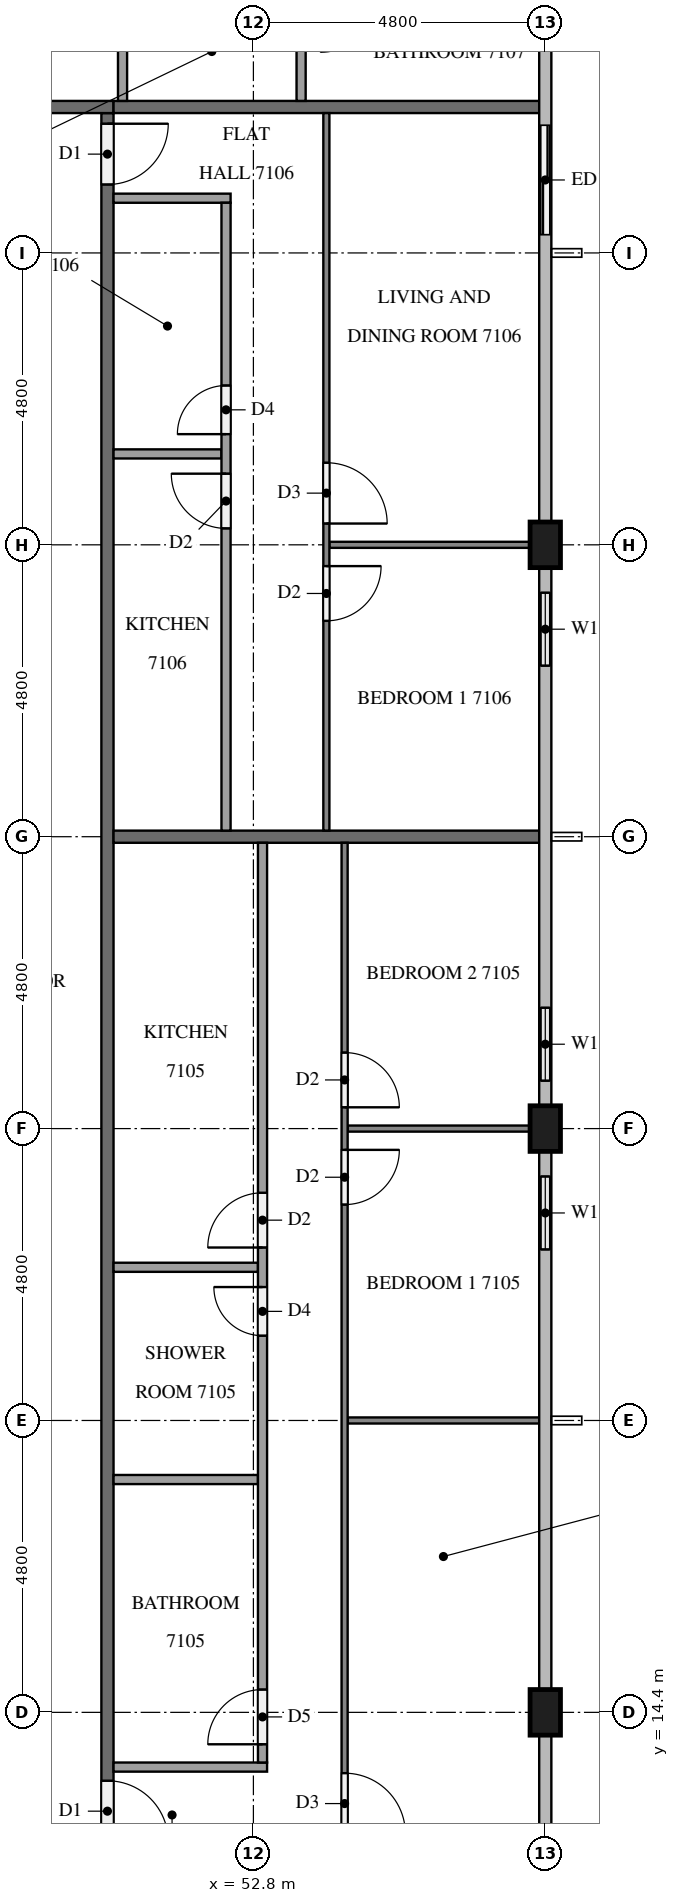
"""IFC4 building model, lengths in metres.
Left out: names, types, materials, properties, quantities, classifications, styles, units other than length and angle.
Written with IfcOpenShell. Run it as: python <this file> out.ifc"""

import sys

from ifc_helpers import new_model, si_unit, direction, frame, frame_2d, origin, origin_2d, place, context, subcontext, project, spatial, rectangle, extrude, element, fill, save


model = new_model("IFC4")
c1 = context("Model", 3, precision=1e-05, world=origin(), true_north=direction((0.0, 1.0)))
c2 = subcontext(c1, "Body", "Model", "MODEL_VIEW")
j1 = project(units=[si_unit("LENGTHUNIT", "METRE"), si_unit("PLANEANGLEUNIT", "RADIAN")], contexts=[c1])
p1 = place(None, origin())
s1 = spatial("IfcSite", under=j1, at=p1, CompositionType="ELEMENT")
p2 = place(p1, origin())
s2 = spatial("IfcBuilding", under=s1, at=p2, CompositionType="ELEMENT")
p3 = place(p2, frame((0.0, 0.0, 272.1)))
s3 = spatial("IfcBuildingStorey", under=s2, at=p3, CompositionType="ELEMENT", Elevation=272.1)
for number, where, z_axis, x_axis in (
    (1, (57.6, 14.4, 0.0), (0.0, 0.0, 1.0), (0.0, 1.0, 0.0)),
    (2, (57.6, 24.0, 0.0), (0.0, 0.0, 1.0), (0.0, 1.0, 0.0)),
    (3, (57.6, 33.6, 0.0), (0.0, 0.0, 1.0), (0.0, 1.0, 0.0)),
):
    element("IfcColumn", number, at=place(p3, frame(where, z_axis=z_axis, x_axis=x_axis)), inside=s3, PredefinedType="COLUMN", context=c2, shape_type="SweptSolid", body=[
        extrude(rectangle(XDim=0.75, YDim=0.5, at=origin_2d()), origin(), (0.0, 0.0, 1.0), 3.2),
    ])
p4 = place(p3, frame((57.6, 21.6, 0.0), z_axis=(0.0, 0.0, 1.0), x_axis=(0.0, 1.0, 0.0)))
e4 = element("IfcWall", 4, at=p4, inside=s3, PredefinedType="SOLIDWALL", context=c2, shape_type="SweptSolid", body=[
    extrude(rectangle(XDim=2.025, YDim=0.15, at=frame_2d((1.012, 0.0))), origin(), (0.0, 0.0, 1.0), 3.2),
])
p5 = place(p4, frame((0.413, 0.0, 0.9)))
e5 = element("IfcOpeningElement", 5, at=p5, cuts=e4, PredefinedType="OPENING", context=c2, shape_type="SweptSolid", body=[
    extrude(rectangle(XDim=1.2, YDim=1.4, at=frame_2d((0.6, 0.7))), frame((0.0, 0.085, 0.0), z_axis=(0.0, -1.0, 0.0), x_axis=(1.0, 0.0, 0.0)), (0.0, 0.0, 1.0), 0.17),
])
p6 = place(p3, frame((57.6, 24.375, 0.0), z_axis=(0.0, 0.0, 1.0), x_axis=(0.0, 1.0, 0.0)))
e6 = element("IfcWall", 6, at=p6, inside=s3, PredefinedType="SOLIDWALL", context=c2, shape_type="SweptSolid", body=[
    extrude(rectangle(XDim=2.025, YDim=0.15, at=frame_2d((1.012, 0.0))), origin(), (0.0, 0.0, 1.0), 3.2),
])
p7 = place(p6, frame((0.413, 0.0, 0.9)))
e7 = element("IfcOpeningElement", 7, at=p7, cuts=e6, PredefinedType="OPENING", context=c2, shape_type="SweptSolid", body=[
    extrude(rectangle(XDim=1.2, YDim=1.4, at=frame_2d((0.6, 0.7))), frame((0.0, 0.085, 0.0), z_axis=(0.0, -1.0, 0.0), x_axis=(1.0, 0.0, 0.0)), (0.0, 0.0, 1.0), 0.17),
])
p8 = place(p3, frame((57.6, 31.2, 0.0), z_axis=(0.0, 0.0, 1.0), x_axis=(0.0, 1.0, 0.0)))
e8 = element("IfcWall", 8, at=p8, inside=s3, PredefinedType="SOLIDWALL", context=c2, shape_type="SweptSolid", body=[
    extrude(rectangle(XDim=2.025, YDim=0.15, at=frame_2d((1.013, 0.0))), origin(), (0.0, 0.0, 1.0), 3.2),
])
p9 = place(p8, frame((0.413, 0.0, 0.9)))
e9 = element("IfcOpeningElement", 9, at=p9, cuts=e8, PredefinedType="OPENING", context=c2, shape_type="SweptSolid", body=[
    extrude(rectangle(XDim=1.2, YDim=1.4, at=frame_2d((0.6, 0.7))), frame((0.0, 0.085, 0.0), z_axis=(0.0, -1.0, 0.0), x_axis=(1.0, 0.0, 0.0)), (0.0, 0.0, 1.0), 0.17),
])
p10 = place(p3, frame((57.6, 38.4, 0.0), z_axis=(0.0, 0.0, 1.0), x_axis=(0.0, 1.0, 0.0)))
e10 = element("IfcWall", 10, at=p10, inside=s3, PredefinedType="SOLIDWALL", context=c2, shape_type="SweptSolid", body=[
    extrude(rectangle(XDim=2.4, YDim=0.15, at=frame_2d((1.2, 0.0))), origin(), (0.0, 0.0, 1.0), 3.2),
])
p11 = place(p10, frame((0.3, 0.0, 0.0)))
e11 = element("IfcOpeningElement", 11, at=p11, cuts=e10, PredefinedType="OPENING", context=c2, shape_type="SweptSolid", body=[
    extrude(rectangle(XDim=1.8, YDim=2.4, at=frame_2d((0.9, 1.2))), frame((0.0, 0.085, 0.0), z_axis=(0.0, -1.0, 0.0), x_axis=(1.0, 0.0, 0.0)), (0.0, 0.0, 1.0), 0.17),
])
p12 = place(p3, frame((50.4, 40.7, 0.0), z_axis=(0.0, 0.0, 1.0), x_axis=(0.0, -1.0, 0.0)))
e12 = element("IfcWall", 12, at=p12, inside=s3, PredefinedType="PARTITIONING", context=c2, shape_type="SweptSolid", body=[
    extrude(rectangle(XDim=28.6, YDim=0.2, at=frame_2d((14.3, 0.0))), origin(), (0.0, 0.0, 1.0), 3.2),
])
p13 = place(p12, frame((27.425, 0.0, 0.0)))
e13 = element("IfcOpeningElement", 13, at=p13, cuts=e12, PredefinedType="OPENING", context=c2, shape_type="SweptSolid", body=[
    extrude(rectangle(XDim=1.0, YDim=2.1, at=frame_2d((0.5, 1.05))), frame((0.0, 0.11, 0.0), z_axis=(0.0, -1.0, 0.0), x_axis=(1.0, 0.0, 0.0)), (0.0, 0.0, 1.0), 0.22),
])
p14 = place(p12, frame((0.175, 0.0, 0.0)))
e14 = element("IfcOpeningElement", 14, at=p14, cuts=e12, PredefinedType="OPENING", context=c2, shape_type="SweptSolid", body=[
    extrude(rectangle(XDim=1.0, YDim=2.1, at=frame_2d((0.5, 1.05))), frame((0.0, 0.11, 0.0), z_axis=(0.0, -1.0, 0.0), x_axis=(1.0, 0.0, 0.0)), (0.0, 0.0, 1.0), 0.22),
])
p15 = place(p3, frame((11.9, 40.8, 0.0), z_axis=(0.0, 0.0, 1.0), x_axis=(1.0, 0.0, 0.0)))
e15 = element("IfcWall", 15, at=p15, inside=s3, PredefinedType="PARTITIONING", context=c2, shape_type="SweptSolid", body=[
    extrude(rectangle(XDim=38.6, YDim=0.2, at=frame_2d((19.3, 0.0))), origin(), (0.0, 0.0, 1.0), 3.2),
])
p16 = place(p15, frame((31.575, 0.0, 0.0)))
e16 = element("IfcOpeningElement", 16, at=p16, cuts=e15, PredefinedType="OPENING", context=c2, shape_type="SweptSolid", body=[
    extrude(rectangle(XDim=1.0, YDim=2.1, at=frame_2d((0.5, 1.05))), frame((0.0, 0.11, 0.0), z_axis=(0.0, -1.0, 0.0), x_axis=(1.0, 0.0, 0.0)), (0.0, 0.0, 1.0), 0.22),
])
p17 = place(p15, frame((24.375, 0.0, 0.0)))
e17 = element("IfcOpeningElement", 17, at=p17, cuts=e15, PredefinedType="OPENING", context=c2, shape_type="SweptSolid", body=[
    extrude(rectangle(XDim=1.0, YDim=2.1, at=frame_2d((0.5, 1.05))), frame((0.0, 0.11, 0.0), z_axis=(0.0, -1.0, 0.0), x_axis=(1.0, 0.0, 0.0)), (0.0, 0.0, 1.0), 0.22),
])
p18 = place(p15, frame((22.825, 0.0, 0.0)))
e18 = element("IfcOpeningElement", 18, at=p18, cuts=e15, PredefinedType="OPENING", context=c2, shape_type="SweptSolid", body=[
    extrude(rectangle(XDim=1.0, YDim=2.1, at=frame_2d((0.5, 1.05))), frame((0.0, 0.11, 0.0), z_axis=(0.0, -1.0, 0.0), x_axis=(1.0, 0.0, 0.0)), (0.0, 0.0, 1.0), 0.22),
])
p19 = place(p15, frame((0.375, 0.0, 0.0)))
e19 = element("IfcOpeningElement", 19, at=p19, cuts=e15, PredefinedType="OPENING", context=c2, shape_type="SweptSolid", body=[
    extrude(rectangle(XDim=1.0, YDim=2.1, at=frame_2d((0.5, 1.05))), frame((0.0, 0.11, 0.0), z_axis=(0.0, -1.0, 0.0), x_axis=(1.0, 0.0, 0.0)), (0.0, 0.0, 1.0), 0.22),
])
for number, where, z_axis, x_axis in (
    (20, (50.5, 28.8, 0.0), (0.0, 0.0, 1.0), (1.0, 0.0, 0.0)),
    (21, (50.5, 40.8, 0.0), (0.0, 0.0, 1.0), (1.0, 0.0, 0.0)),
):
    element("IfcWall", number, at=place(p3, frame(where, z_axis=z_axis, x_axis=x_axis)), inside=s3, PredefinedType="PARTITIONING", context=c2, shape_type="SweptSolid", body=[
        extrude(rectangle(XDim=7.0, YDim=0.2, at=frame_2d((3.5, 0.0))), origin(), (0.0, 0.0, 1.0), 3.2),
    ])
p20 = place(p3, frame((54.35, 19.2, 0.0), z_axis=(0.0, 0.0, 1.0), x_axis=(1.0, 0.0, 0.0)))
e22 = element("IfcWall", 22, at=p20, inside=s3, PredefinedType="PARTITIONING", context=c2, shape_type="SweptSolid", body=[
    extrude(rectangle(XDim=3.15, YDim=0.1, at=frame_2d((1.575, 0.0))), origin(), (0.0, 0.0, 1.0), 3.2),
])
p21 = place(p3, frame((54.35, 24.0, 0.0), z_axis=(0.0, 0.0, 1.0), x_axis=(1.0, 0.0, 0.0)))
e23 = element("IfcWall", 23, at=p21, inside=s3, PredefinedType="PARTITIONING", context=c2, shape_type="SweptSolid", body=[
    extrude(rectangle(XDim=3.0, YDim=0.1, at=frame_2d((1.5, 0.0))), origin(), (0.0, 0.0, 1.0), 3.2),
])
p22 = place(p3, frame((54.3, 28.7, 0.0), z_axis=(0.0, 0.0, 1.0), x_axis=(0.0, -1.0, 0.0)))
e24 = element("IfcWall", 24, at=p22, inside=s3, PredefinedType="PARTITIONING", context=c2, shape_type="SweptSolid", body=[
    extrude(rectangle(XDim=16.6, YDim=0.1, at=frame_2d((8.3, 0.0))), origin(), (0.0, 0.0, 1.0), 3.2),
])
p23 = place(p22, frame((15.3, 0.0, 0.0)))
e25 = element("IfcOpeningElement", 25, at=p23, cuts=e24, PredefinedType="OPENING", context=c2, shape_type="SweptSolid", body=[
    extrude(rectangle(XDim=1.0, YDim=2.1, at=frame_2d((0.5, 1.05))), frame((0.0, 0.06, 0.0), z_axis=(0.0, -1.0, 0.0), x_axis=(1.0, 0.0, 0.0)), (0.0, 0.0, 1.0), 0.12),
])
p24 = place(p22, frame((5.05, 0.0, 0.0)))
e26 = element("IfcOpeningElement", 26, at=p24, cuts=e24, PredefinedType="OPENING", context=c2, shape_type="SweptSolid", body=[
    extrude(rectangle(XDim=0.9, YDim=2.1, at=frame_2d((0.45, 1.05))), frame((0.0, 0.06, 0.0), z_axis=(0.0, -1.0, 0.0), x_axis=(1.0, 0.0, 0.0)), (0.0, 0.0, 1.0), 0.12),
])
p25 = place(p22, frame((3.45, 0.0, 0.0)))
e27 = element("IfcOpeningElement", 27, at=p25, cuts=e24, PredefinedType="OPENING", context=c2, shape_type="SweptSolid", body=[
    extrude(rectangle(XDim=0.9, YDim=2.1, at=frame_2d((0.45, 1.05))), frame((0.0, 0.06, 0.0), z_axis=(0.0, -1.0, 0.0), x_axis=(1.0, 0.0, 0.0)), (0.0, 0.0, 1.0), 0.12),
])
for number, where, z_axis, x_axis in (
    (28, (50.5, 18.229, 0.0), (0.0, 0.0, 1.0), (1.0, 0.0, 0.0)),
    (29, (50.5, 21.719, 0.0), (0.0, 0.0, 1.0), (1.0, 0.0, 0.0)),
):
    element("IfcWall", number, at=place(p3, frame(where, z_axis=z_axis, x_axis=x_axis)), inside=s3, PredefinedType="PARTITIONING", context=c2, shape_type="SweptSolid", body=[
        extrude(rectangle(XDim=2.375, YDim=0.15, at=frame_2d((1.188, 0.0))), origin(), (0.0, 0.0, 1.0), 3.2),
    ])
p26 = place(p3, frame((50.5, 13.5, 0.0), z_axis=(0.0, 0.0, 1.0), x_axis=(1.0, 0.0, 0.0)))
e30 = element("IfcWall", 30, at=p26, inside=s3, PredefinedType="PARTITIONING", context=c2, shape_type="SweptSolid", body=[
    extrude(rectangle(XDim=2.525, YDim=0.15, at=frame_2d((1.262, 0.0))), origin(), (0.0, 0.0, 1.0), 3.2),
])
p27 = place(p3, frame((52.95, 13.575, 0.0), z_axis=(0.0, 0.0, 1.0), x_axis=(0.0, 1.0, 0.0)))
e31 = element("IfcWall", 31, at=p27, inside=s3, PredefinedType="PARTITIONING", context=c2, shape_type="SweptSolid", body=[
    extrude(rectangle(XDim=15.125, YDim=0.15, at=frame_2d((7.562, 0.0))), origin(), (0.0, 0.0, 1.0), 3.2),
])
p28 = place(p27, frame((0.3, 0.0, 0.0)))
e32 = element("IfcOpeningElement", 32, at=p28, cuts=e31, PredefinedType="OPENING", context=c2, shape_type="SweptSolid", body=[
    extrude(rectangle(XDim=0.9, YDim=2.1, at=frame_2d((0.45, 1.05))), frame((0.0, 0.085, 0.0), z_axis=(0.0, -1.0, 0.0), x_axis=(1.0, 0.0, 0.0)), (0.0, 0.0, 1.0), 0.17),
])
p29 = place(p27, frame((7.019, 0.0, 0.0)))
e33 = element("IfcOpeningElement", 33, at=p29, cuts=e31, PredefinedType="OPENING", context=c2, shape_type="SweptSolid", body=[
    extrude(rectangle(XDim=0.8, YDim=2.1, at=frame_2d((0.4, 1.05))), frame((0.0, 0.085, 0.0), z_axis=(0.0, -1.0, 0.0), x_axis=(1.0, 0.0, 0.0)), (0.0, 0.0, 1.0), 0.17),
])
p30 = place(p27, frame((8.469, 0.0, 0.0)))
e34 = element("IfcOpeningElement", 34, at=p30, cuts=e31, PredefinedType="OPENING", context=c2, shape_type="SweptSolid", body=[
    extrude(rectangle(XDim=0.9, YDim=2.1, at=frame_2d((0.45, 1.05))), frame((0.0, 0.085, 0.0), z_axis=(0.0, -1.0, 0.0), x_axis=(1.0, 0.0, 0.0)), (0.0, 0.0, 1.0), 0.17),
])
p31 = place(p3, frame((54.05, 33.6, 0.0), z_axis=(0.0, 0.0, 1.0), x_axis=(1.0, 0.0, 0.0)))
e35 = element("IfcWall", 35, at=p31, inside=s3, PredefinedType="PARTITIONING", context=c2, shape_type="SweptSolid", body=[
    extrude(rectangle(XDim=3.3, YDim=0.1, at=frame_2d((1.65, 0.0))), origin(), (0.0, 0.0, 1.0), 3.2),
])
p32 = place(p3, frame((54.0, 40.7, 0.0), z_axis=(0.0, 0.0, 1.0), x_axis=(0.0, -1.0, 0.0)))
e36 = element("IfcWall", 36, at=p32, inside=s3, PredefinedType="PARTITIONING", context=c2, shape_type="SweptSolid", body=[
    extrude(rectangle(XDim=11.8, YDim=0.1, at=frame_2d((5.9, 0.0))), origin(), (0.0, 0.0, 1.0), 3.2),
])
p33 = place(p32, frame((5.75, 0.0, 0.0)))
e37 = element("IfcOpeningElement", 37, at=p33, cuts=e36, PredefinedType="OPENING", context=c2, shape_type="SweptSolid", body=[
    extrude(rectangle(XDim=1.0, YDim=2.1, at=frame_2d((0.5, 1.05))), frame((0.0, 0.06, 0.0), z_axis=(0.0, -1.0, 0.0), x_axis=(1.0, 0.0, 0.0)), (0.0, 0.0, 1.0), 0.12),
])
p34 = place(p32, frame((7.45, 0.0, 0.0)))
e38 = element("IfcOpeningElement", 38, at=p34, cuts=e36, PredefinedType="OPENING", context=c2, shape_type="SweptSolid", body=[
    extrude(rectangle(XDim=0.9, YDim=2.1, at=frame_2d((0.45, 1.05))), frame((0.0, 0.06, 0.0), z_axis=(0.0, -1.0, 0.0), x_axis=(1.0, 0.0, 0.0)), (0.0, 0.0, 1.0), 0.12),
])
p35 = place(p3, frame((50.5, 35.095, 0.0), z_axis=(0.0, 0.0, 1.0), x_axis=(1.0, 0.0, 0.0)))
e39 = element("IfcWall", 39, at=p35, inside=s3, PredefinedType="PARTITIONING", context=c2, shape_type="SweptSolid", body=[
    extrude(rectangle(XDim=1.775, YDim=0.15, at=frame_2d((0.887, 0.0))), origin(), (0.0, 0.0, 1.0), 3.2),
])
p36 = place(p3, frame((50.5, 39.3, 0.0), z_axis=(0.0, 0.0, 1.0), x_axis=(1.0, 0.0, 0.0)))
e40 = element("IfcWall", 40, at=p36, inside=s3, PredefinedType="PARTITIONING", context=c2, shape_type="SweptSolid", body=[
    extrude(rectangle(XDim=1.925, YDim=0.15, at=frame_2d((0.962, 0.0))), origin(), (0.0, 0.0, 1.0), 3.2),
])
p37 = place(p3, frame((52.35, 28.9, 0.0), z_axis=(0.0, 0.0, 1.0), x_axis=(0.0, 1.0, 0.0)))
e41 = element("IfcWall", 41, at=p37, inside=s3, PredefinedType="PARTITIONING", context=c2, shape_type="SweptSolid", body=[
    extrude(rectangle(XDim=10.325, YDim=0.15, at=frame_2d((5.163, 0.0))), origin(), (0.0, 0.0, 1.0), 3.2),
])
p38 = place(p37, frame((6.52, 0.0, 0.0)))
e42 = element("IfcOpeningElement", 42, at=p38, cuts=e41, PredefinedType="OPENING", context=c2, shape_type="SweptSolid", body=[
    extrude(rectangle(XDim=0.8, YDim=2.1, at=frame_2d((0.4, 1.05))), frame((0.0, 0.085, 0.0), z_axis=(0.0, -1.0, 0.0), x_axis=(1.0, 0.0, 0.0)), (0.0, 0.0, 1.0), 0.17),
])
p39 = place(p37, frame((4.97, 0.0, 0.0)))
e43 = element("IfcOpeningElement", 43, at=p39, cuts=e41, PredefinedType="OPENING", context=c2, shape_type="SweptSolid", body=[
    extrude(rectangle(XDim=0.9, YDim=2.1, at=frame_2d((0.45, 1.05))), frame((0.0, 0.085, 0.0), z_axis=(0.0, -1.0, 0.0), x_axis=(1.0, 0.0, 0.0)), (0.0, 0.0, 1.0), 0.17),
])
for number, where, z_axis, x_axis in (
    (44, (50.648, 40.9, 0.0), (0.0, 0.0, 1.0), (0.0, 1.0, 0.0)),
    (45, (53.585, 40.9, 0.0), (0.0, 0.0, 1.0), (0.0, 1.0, 0.0)),
):
    element("IfcWall", number, at=place(p3, frame(where, z_axis=z_axis, x_axis=x_axis)), inside=s3, PredefinedType="PARTITIONING", context=c2, shape_type="SweptSolid", body=[
        extrude(rectangle(XDim=1.625, YDim=0.15, at=frame_2d((0.812, 0.0))), origin(), (0.0, 0.0, 1.0), 3.2),
    ])
p40 = place(p5, origin())
e46 = element("IfcWindow", 46, at=p40, inside=s3, PartitioningType="SINGLE_PANEL", PredefinedType="WINDOW", context=c2, shape_type="SweptSolid", body=[
    extrude(rectangle(XDim=1.2, YDim=1.4, at=frame_2d((0.6, 0.7))), frame((0.0, 0.03, 0.0), z_axis=(0.0, -1.0, 0.0), x_axis=(1.0, 0.0, 0.0)), (0.0, 0.0, 1.0), 0.06),
])
fill(e5, e46)
p41 = place(p7, origin())
e47 = element("IfcWindow", 47, at=p41, inside=s3, PartitioningType="SINGLE_PANEL", PredefinedType="WINDOW", context=c2, shape_type="SweptSolid", body=[
    extrude(rectangle(XDim=1.2, YDim=1.4, at=frame_2d((0.6, 0.7))), frame((0.0, 0.03, 0.0), z_axis=(0.0, -1.0, 0.0), x_axis=(1.0, 0.0, 0.0)), (0.0, 0.0, 1.0), 0.06),
])
fill(e7, e47)
p42 = place(p9, origin())
e48 = element("IfcWindow", 48, at=p42, inside=s3, PartitioningType="SINGLE_PANEL", PredefinedType="WINDOW", context=c2, shape_type="SweptSolid", body=[
    extrude(rectangle(XDim=1.2, YDim=1.4, at=frame_2d((0.6, 0.7))), frame((0.0, 0.03, 0.0), z_axis=(0.0, -1.0, 0.0), x_axis=(1.0, 0.0, 0.0)), (0.0, 0.0, 1.0), 0.06),
])
fill(e9, e48)
p43 = place(p11, origin())
e49 = element("IfcDoor", 49, at=p43, inside=s3, OperationType="SLIDING_TO_LEFT", PredefinedType="DOOR", context=c2, shape_type="SweptSolid", body=[
    extrude(rectangle(XDim=1.8, YDim=2.4, at=frame_2d((0.9, 1.2))), frame((0.0, 0.025, 0.0), z_axis=(0.0, -1.0, 0.0), x_axis=(1.0, 0.0, 0.0)), (0.0, 0.0, 1.0), 0.05),
])
fill(e11, e49)
p44 = place(p13, origin())
e50 = element("IfcDoor", 50, at=p44, inside=s3, OperationType="SINGLE_SWING_RIGHT", PredefinedType="DOOR", context=c2, shape_type="SweptSolid", body=[
    extrude(rectangle(XDim=1.0, YDim=2.1, at=frame_2d((0.5, 1.05))), frame((0.0, 0.025, 0.0), z_axis=(0.0, -1.0, 0.0), x_axis=(1.0, 0.0, 0.0)), (0.0, 0.0, 1.0), 0.05),
])
fill(e13, e50)
p45 = place(p14, origin())
e51 = element("IfcDoor", 51, at=p45, inside=s3, OperationType="SINGLE_SWING_LEFT", PredefinedType="DOOR", context=c2, shape_type="SweptSolid", body=[
    extrude(rectangle(XDim=1.0, YDim=2.1, at=frame_2d((0.5, 1.05))), frame((0.0, 0.025, 0.0), z_axis=(0.0, -1.0, 0.0), x_axis=(1.0, 0.0, 0.0)), (0.0, 0.0, 1.0), 0.05),
])
fill(e14, e51)
p46 = place(p23, origin())
e52 = element("IfcDoor", 52, at=p46, inside=s3, OperationType="SINGLE_SWING_RIGHT", PredefinedType="DOOR", context=c2, shape_type="SweptSolid", body=[
    extrude(rectangle(XDim=1.0, YDim=2.1, at=frame_2d((0.5, 1.05))), frame((0.0, 0.025, 0.0), z_axis=(0.0, -1.0, 0.0), x_axis=(1.0, 0.0, 0.0)), (0.0, 0.0, 1.0), 0.05),
])
fill(e25, e52)
p47 = place(p24, origin())
e53 = element("IfcDoor", 53, at=p47, inside=s3, OperationType="SINGLE_SWING_LEFT", PredefinedType="DOOR", context=c2, shape_type="SweptSolid", body=[
    extrude(rectangle(XDim=0.9, YDim=2.1, at=frame_2d((0.45, 1.05))), frame((0.0, 0.025, 0.0), z_axis=(0.0, -1.0, 0.0), x_axis=(1.0, 0.0, 0.0)), (0.0, 0.0, 1.0), 0.05),
])
fill(e26, e53)
p48 = place(p25, origin())
e54 = element("IfcDoor", 54, at=p48, inside=s3, OperationType="SINGLE_SWING_RIGHT", PredefinedType="DOOR", context=c2, shape_type="SweptSolid", body=[
    extrude(rectangle(XDim=0.9, YDim=2.1, at=frame_2d((0.45, 1.05))), frame((0.0, 0.025, 0.0), z_axis=(0.0, -1.0, 0.0), x_axis=(1.0, 0.0, 0.0)), (0.0, 0.0, 1.0), 0.05),
])
fill(e27, e54)
p49 = place(p28, origin())
e55 = element("IfcDoor", 55, at=p49, inside=s3, OperationType="SINGLE_SWING_LEFT", PredefinedType="DOOR", context=c2, shape_type="SweptSolid", body=[
    extrude(rectangle(XDim=0.9, YDim=2.1, at=frame_2d((0.45, 1.05))), frame((0.0, 0.025, 0.0), z_axis=(0.0, -1.0, 0.0), x_axis=(1.0, 0.0, 0.0)), (0.0, 0.0, 1.0), 0.05),
])
fill(e32, e55)
p50 = place(p29, origin())
e56 = element("IfcDoor", 56, at=p50, inside=s3, OperationType="SINGLE_SWING_RIGHT", PredefinedType="DOOR", context=c2, shape_type="SweptSolid", body=[
    extrude(rectangle(XDim=0.8, YDim=2.1, at=frame_2d((0.4, 1.05))), frame((0.0, 0.025, 0.0), z_axis=(0.0, -1.0, 0.0), x_axis=(1.0, 0.0, 0.0)), (0.0, 0.0, 1.0), 0.05),
])
fill(e33, e56)
p51 = place(p30, origin())
e57 = element("IfcDoor", 57, at=p51, inside=s3, OperationType="SINGLE_SWING_LEFT", PredefinedType="DOOR", context=c2, shape_type="SweptSolid", body=[
    extrude(rectangle(XDim=0.9, YDim=2.1, at=frame_2d((0.45, 1.05))), frame((0.0, 0.025, 0.0), z_axis=(0.0, -1.0, 0.0), x_axis=(1.0, 0.0, 0.0)), (0.0, 0.0, 1.0), 0.05),
])
fill(e34, e57)
p52 = place(p33, origin())
e58 = element("IfcDoor", 58, at=p52, inside=s3, OperationType="SINGLE_SWING_RIGHT", PredefinedType="DOOR", context=c2, shape_type="SweptSolid", body=[
    extrude(rectangle(XDim=1.0, YDim=2.1, at=frame_2d((0.5, 1.05))), frame((0.0, 0.025, 0.0), z_axis=(0.0, -1.0, 0.0), x_axis=(1.0, 0.0, 0.0)), (0.0, 0.0, 1.0), 0.05),
])
fill(e37, e58)
p53 = place(p34, origin())
e59 = element("IfcDoor", 59, at=p53, inside=s3, OperationType="SINGLE_SWING_LEFT", PredefinedType="DOOR", context=c2, shape_type="SweptSolid", body=[
    extrude(rectangle(XDim=0.9, YDim=2.1, at=frame_2d((0.45, 1.05))), frame((0.0, 0.025, 0.0), z_axis=(0.0, -1.0, 0.0), x_axis=(1.0, 0.0, 0.0)), (0.0, 0.0, 1.0), 0.05),
])
fill(e38, e59)
p54 = place(p38, origin())
e60 = element("IfcDoor", 60, at=p54, inside=s3, OperationType="SINGLE_SWING_LEFT", PredefinedType="DOOR", context=c2, shape_type="SweptSolid", body=[
    extrude(rectangle(XDim=0.8, YDim=2.1, at=frame_2d((0.4, 1.05))), frame((0.0, 0.025, 0.0), z_axis=(0.0, -1.0, 0.0), x_axis=(1.0, 0.0, 0.0)), (0.0, 0.0, 1.0), 0.05),
])
fill(e42, e60)
p55 = place(p39, origin())
e61 = element("IfcDoor", 61, at=p55, inside=s3, OperationType="SINGLE_SWING_RIGHT", PredefinedType="DOOR", context=c2, shape_type="SweptSolid", body=[
    extrude(rectangle(XDim=0.9, YDim=2.1, at=frame_2d((0.45, 1.05))), frame((0.0, 0.025, 0.0), z_axis=(0.0, -1.0, 0.0), x_axis=(1.0, 0.0, 0.0)), (0.0, 0.0, 1.0), 0.05),
])
fill(e43, e61)
save(model, sys.argv[1])
